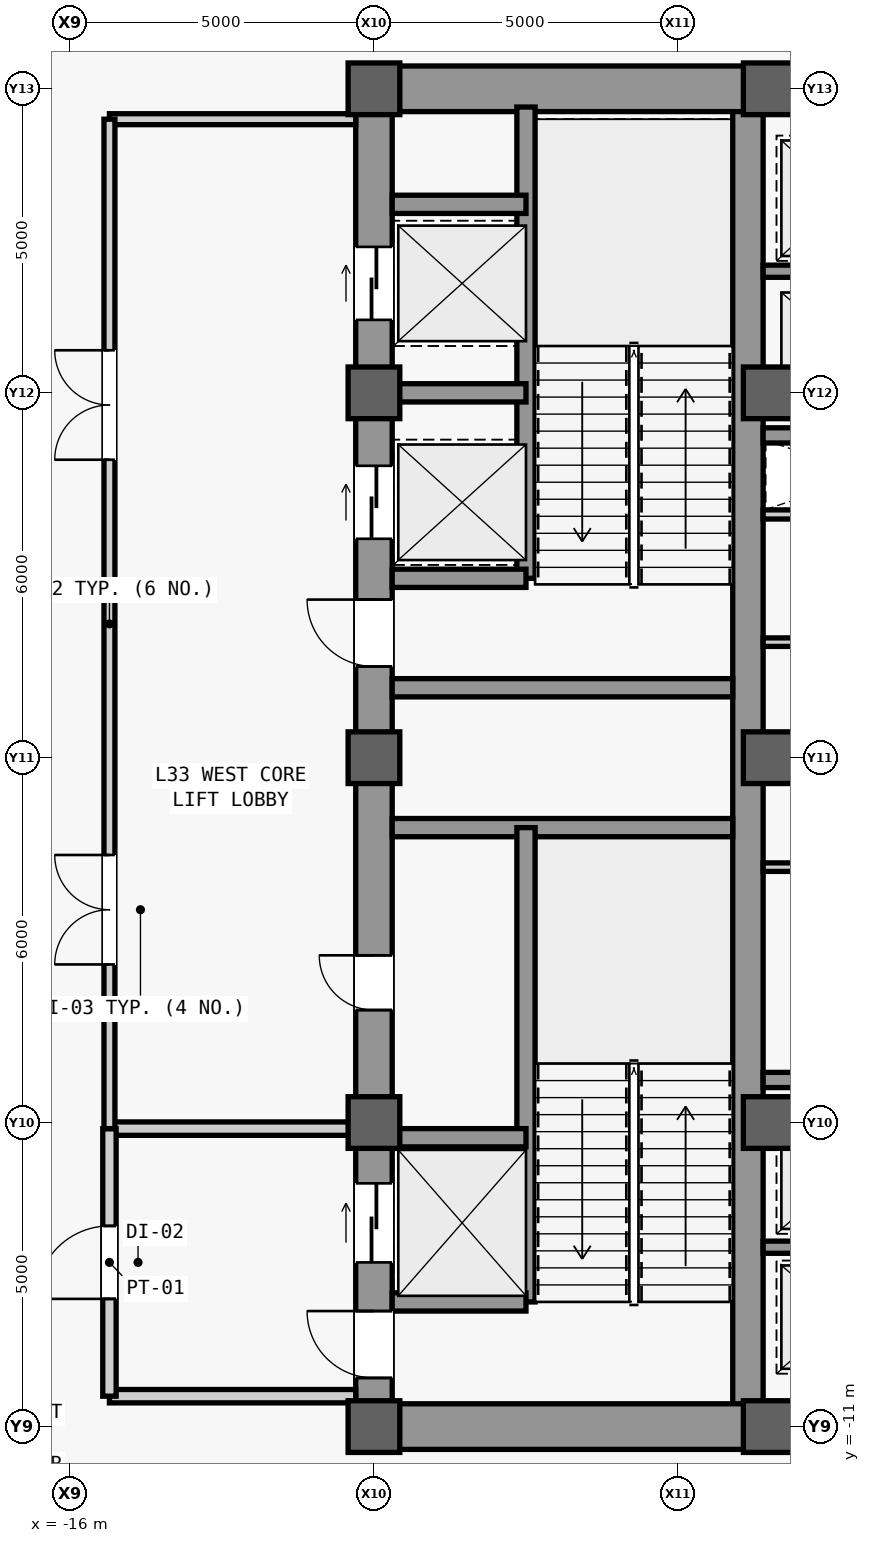
"""IFC4 building model, lengths in metres.
Left out: names, types, materials, properties, quantities, classifications, styles, units other than length and angle.
Written with IfcOpenShell. Run it as: python <this file> out.ifc"""

import sys

from ifc_helpers import new_model, si_unit, direction, frame, frame_2d, origin, origin_2d, place, context, subcontext, project, spatial, rectangle, extrude, source, transform, mapped, element, fill, save


model = new_model("IFC4")
c1 = context("Model", 3, precision=1e-05, world=origin(), true_north=direction((0.0, 1.0)))
c2 = subcontext(c1, "Body", "Model", "MODEL_VIEW")
j1 = project(units=[si_unit("LENGTHUNIT", "METRE"), si_unit("PLANEANGLEUNIT", "RADIAN")], contexts=[c1])
p1 = place(None, origin())
s1 = spatial("IfcSite", under=j1, at=p1, CompositionType="ELEMENT")
p2 = place(p1, origin())
s2 = spatial("IfcBuilding", under=s1, at=p2, CompositionType="ELEMENT")
p3 = place(p2, frame((0.0, 0.0, 144.7)))
s3 = spatial("IfcBuildingStorey", under=s2, at=p3, CompositionType="ELEMENT", Elevation=144.7)
m1 = source(origin(), c2, "Body", "SweptSolid", [
    extrude(rectangle(XDim=22.0, YDim=0.6, at=frame_2d((11.0, 0.0))), origin(), (0.0, 0.0, 1.0), 4.6),
])
p4 = place(p3, frame((-11.0, -11.0, 0.0), z_axis=(0.0, 0.0, 1.0), x_axis=(0.0, 1.0, 0.0)))
e1 = element("IfcWall", 1, at=p4, inside=s3, PredefinedType="SHEAR", context=c2, shape_type="MappedRepresentation", body=[
    mapped(m1, transform((0.0, 0.0, 0.0), scale=1.0)),
])
m2 = source(origin(), c2, "Body", "SweptSolid", [
    extrude(rectangle(XDim=1.1, YDim=2.2, at=frame_2d((0.55, 1.1))), frame((0.0, 0.31, 0.0), z_axis=(0.0, -1.0, 0.0), x_axis=(1.0, 0.0, 0.0)), (0.0, 0.0, 1.0), 0.62),
])
p5 = place(p4, frame((0.8, 0.0, 0.0)))
e2 = element("IfcOpeningElement", 2, at=p5, cuts=e1, PredefinedType="OPENING", context=c2, shape_type="MappedRepresentation", body=[
    mapped(m2, transform((0.0, 0.0, 0.0), scale=1.0)),
])
p6 = place(p4, frame((12.5, 0.0, 0.0)))
e3 = element("IfcOpeningElement", 3, at=p6, cuts=e1, PredefinedType="OPENING", context=c2, shape_type="MappedRepresentation", body=[
    mapped(m2, transform((0.0, 0.0, 0.0), scale=1.0)),
])
m3 = source(origin(), c2, "Body", "SweptSolid", [
    extrude(rectangle(XDim=0.9, YDim=2.15, at=frame_2d((0.45, 1.075))), frame((0.0, 0.31, 0.0), z_axis=(0.0, -1.0, 0.0), x_axis=(1.0, 0.0, 0.0)), (0.0, 0.0, 1.0), 0.62),
])
p7 = place(p4, frame((6.85, 0.0, 0.0)))
e4 = element("IfcOpeningElement", 4, at=p7, cuts=e1, PredefinedType="OPENING", context=c2, shape_type="MappedRepresentation", body=[
    mapped(m3, transform((0.0, 0.0, 0.0), scale=1.0)),
])
m4 = source(origin(), c2, "Body", "SweptSolid", [
    extrude(rectangle(XDim=1.2, YDim=2.3, at=frame_2d((0.6, 1.15))), frame((0.0, 0.31, 0.0), z_axis=(0.0, -1.0, 0.0), x_axis=(1.0, 0.0, 0.0)), (0.0, 0.0, 1.0), 0.62),
])
p8 = place(p4, frame((14.6, 0.0, 0.0)))
e5 = element("IfcOpeningElement", 5, at=p8, cuts=e1, PredefinedType="OPENING", context=c2, shape_type="MappedRepresentation", body=[
    mapped(m4, transform((0.0, 0.0, 0.0), scale=1.0)),
])
p9 = place(p4, frame((18.2, 0.0, 0.0)))
e6 = element("IfcOpeningElement", 6, at=p9, cuts=e1, PredefinedType="OPENING", context=c2, shape_type="MappedRepresentation", body=[
    mapped(m4, transform((0.0, 0.0, 0.0), scale=1.0)),
])
m5 = source(origin(), c2, "Body", "SweptSolid", [
    extrude(rectangle(XDim=1.3, YDim=2.3, at=frame_2d((0.65, 1.15))), frame((0.0, 0.31, 0.0), z_axis=(0.0, -1.0, 0.0), x_axis=(1.0, 0.0, 0.0)), (0.0, 0.0, 1.0), 0.62),
])
p10 = place(p4, frame((2.7, 0.0, 0.0)))
e7 = element("IfcOpeningElement", 7, at=p10, cuts=e1, PredefinedType="OPENING", context=c2, shape_type="MappedRepresentation", body=[
    mapped(m5, transform((0.0, 0.0, 0.0), scale=1.0)),
])
m6 = source(origin(), c2, "Body", "SweptSolid", [
    extrude(rectangle(XDim=21.4, YDim=0.5, at=frame_2d((10.7, 0.0))), origin(), (0.0, 0.0, 1.0), 4.6),
])
p11 = place(p3, frame((-4.85, -10.7, 0.0), z_axis=(0.0, 0.0, 1.0), x_axis=(0.0, 1.0, 0.0)))
e8 = element("IfcWall", 8, at=p11, inside=s3, PredefinedType="SHEAR", context=c2, shape_type="MappedRepresentation", body=[
    mapped(m6, transform((0.0, 0.0, 0.0), scale=1.0)),
])
m7 = source(origin(), c2, "Body", "SweptSolid", [
    extrude(rectangle(XDim=5.85, YDim=0.75, at=frame_2d((2.925, 0.0))), origin(), (0.0, 0.0, 1.0), 4.6),
])
for number, where, z_axis, x_axis in (
    (9, (-10.7, -11.0, 0.0), (0.0, 0.0, 1.0), (1.0, 0.0, 0.0)),
    (10, (-10.7, 11.0, 0.0), (0.0, 0.0, 1.0), (1.0, 0.0, 0.0)),
):
    element("IfcWall", number, at=place(p3, frame(where, z_axis=z_axis, x_axis=x_axis)), inside=s3, PredefinedType="SHEAR", context=c2, shape_type="MappedRepresentation", body=[
        mapped(m7, transform((0.0, 0.0, 0.0), scale=1.0)),
    ])
m8 = source(origin(), c2, "Body", "SweptSolid", [
    extrude(rectangle(XDim=5.6, YDim=0.3, at=frame_2d((2.8, 0.0))), origin(), (0.0, 0.0, 1.0), 4.6),
])
for number, where, z_axis, x_axis in (
    (11, (-10.7, -1.15, 0.0), (0.0, 0.0, 1.0), (1.0, 0.0, 0.0)),
    (12, (-10.7, 1.15, 0.0), (0.0, 0.0, 1.0), (1.0, 0.0, 0.0)),
):
    element("IfcWall", number, at=place(p3, frame(where, z_axis=z_axis, x_axis=x_axis)), inside=s3, PredefinedType="SHEAR", context=c2, shape_type="MappedRepresentation", body=[
        mapped(m8, transform((0.0, 0.0, 0.0), scale=1.0)),
    ])
m9 = source(origin(), c2, "Body", "SweptSolid", [
    extrude(rectangle(XDim=9.2, YDim=0.5, at=frame_2d((4.6, 0.0))), origin(), (0.0, 0.0, 1.0), 4.6),
])
p12 = place(p3, frame((-4.6, -11.0, 0.0), z_axis=(0.0, 0.0, 1.0), x_axis=(1.0, 0.0, 0.0)))
e13 = element("IfcWall", 13, at=p12, inside=s3, PredefinedType="SHEAR", context=c2, shape_type="MappedRepresentation", body=[
    mapped(m9, transform((0.0, 0.0, 0.0), scale=1.0)),
])
m10 = source(origin(), c2, "Body", "SweptSolid", [
    extrude(rectangle(XDim=1.8, YDim=2.25, at=frame_2d((0.9, 1.125))), frame((0.0, 0.26, 0.0), z_axis=(0.0, -1.0, 0.0), x_axis=(1.0, 0.0, 0.0)), (0.0, 0.0, 1.0), 0.52),
])
p13 = place(p12, frame((3.7, 0.0, 0.0)))
e14 = element("IfcOpeningElement", 14, at=p13, cuts=e13, PredefinedType="OPENING", context=c2, shape_type="MappedRepresentation", body=[
    mapped(m10, transform((0.0, 0.0, 0.0), scale=1.0)),
])
p14 = place(p3, frame((-4.6, 11.0, 0.0), z_axis=(0.0, 0.0, 1.0), x_axis=(1.0, 0.0, 0.0)))
e15 = element("IfcWall", 15, at=p14, inside=s3, PredefinedType="SHEAR", context=c2, shape_type="MappedRepresentation", body=[
    mapped(m9, transform((0.0, 0.0, 0.0), scale=1.0)),
])
p15 = place(p14, frame((3.7, 0.0, 0.0)))
e16 = element("IfcOpeningElement", 16, at=p15, cuts=e15, PredefinedType="OPENING", context=c2, shape_type="MappedRepresentation", body=[
    mapped(m10, transform((0.0, 0.0, 0.0), scale=1.0)),
])
m11 = source(origin(), c2, "Body", "SweptSolid", [
    extrude(rectangle(XDim=0.85, YDim=0.85, at=origin_2d()), origin(), (0.0, 0.0, 1.0), 5.2),
])
for number, where, z_axis, x_axis in (
    (17, (-11.0, -11.0, 0.0), (0.0, 0.0, 1.0), (1.0, 0.0, 0.0)),
    (18, (-11.0, -6.0, 0.0), (0.0, 0.0, 1.0), (1.0, 0.0, 0.0)),
    (19, (-11.0, 0.0, 0.0), (0.0, 0.0, 1.0), (1.0, 0.0, 0.0)),
    (20, (-11.0, 6.0, 0.0), (0.0, 0.0, 1.0), (1.0, 0.0, 0.0)),
    (21, (-11.0, 11.0, 0.0), (0.0, 0.0, 1.0), (1.0, 0.0, 0.0)),
    (22, (-4.5, -11.0, 0.0), (0.0, 0.0, 1.0), (1.0, 0.0, 0.0)),
    (23, (-4.5, -6.0, 0.0), (0.0, 0.0, 1.0), (1.0, 0.0, 0.0)),
    (24, (-4.5, 0.0, 0.0), (0.0, 0.0, 1.0), (1.0, 0.0, 0.0)),
    (25, (-4.5, 6.0, 0.0), (0.0, 0.0, 1.0), (1.0, 0.0, 0.0)),
    (26, (-4.5, 11.0, 0.0), (0.0, 0.0, 1.0), (1.0, 0.0, 0.0)),
):
    element("IfcColumn", number, at=place(p3, frame(where, z_axis=z_axis, x_axis=x_axis)), inside=s3, PredefinedType="COLUMN", context=c2, shape_type="MappedRepresentation", body=[
        mapped(m11, transform((0.0, 0.0, 0.0), scale=1.0)),
    ])
m12 = source(origin(), c2, "Body", "SweptSolid", [
    extrude(rectangle(XDim=7.8, YDim=0.3, at=frame_2d((3.9, 0.0))), origin(), (0.0, 0.0, 1.0), 4.6),
])
p16 = place(p3, frame((-8.5, -8.95, 0.0), z_axis=(0.0, 0.0, 1.0), x_axis=(0.0, 1.0, 0.0)))
e27 = element("IfcWall", 27, at=p16, inside=s3, PredefinedType="SHEAR", context=c2, shape_type="MappedRepresentation", body=[
    mapped(m12, transform((0.0, 0.0, 0.0), scale=1.0)),
])
m13 = source(origin(), c2, "Body", "SweptSolid", [
    extrude(rectangle(XDim=2.2, YDim=0.3, at=frame_2d((1.1, 0.0))), origin(), (0.0, 0.0, 1.0), 4.6),
])
for number, where, z_axis, x_axis in (
    (28, (-10.7, -8.95, 0.0), (0.0, 0.0, 1.0), (1.0, 0.0, 0.0)),
    (29, (-10.7, -6.25, 0.0), (0.0, 0.0, 1.0), (1.0, 0.0, 0.0)),
):
    element("IfcWall", number, at=place(p3, frame(where, z_axis=z_axis, x_axis=x_axis)), inside=s3, PredefinedType="SHEAR", context=c2, shape_type="MappedRepresentation", body=[
        mapped(m13, transform((0.0, 0.0, 0.0), scale=1.0)),
    ])
m14 = source(origin(), c2, "Body", "SweptSolid", [
    extrude(rectangle(XDim=7.75, YDim=0.3, at=frame_2d((3.875, 0.0))), origin(), (0.0, 0.0, 1.0), 4.6),
])
p17 = place(p3, frame((-8.5, 2.95, 0.0), z_axis=(0.0, 0.0, 1.0), x_axis=(0.0, 1.0, 0.0)))
e30 = element("IfcWall", 30, at=p17, inside=s3, PredefinedType="SHEAR", context=c2, shape_type="MappedRepresentation", body=[
    mapped(m14, transform((0.0, 0.0, 0.0), scale=1.0)),
])
for number, where, z_axis, x_axis in (
    (31, (-10.7, 2.95, 0.0), (0.0, 0.0, 1.0), (1.0, 0.0, 0.0)),
    (32, (-10.7, 6.0, 0.0), (0.0, 0.0, 1.0), (1.0, 0.0, 0.0)),
    (33, (-10.7, 9.1, 0.0), (0.0, 0.0, 1.0), (1.0, 0.0, 0.0)),
):
    element("IfcWall", number, at=place(p3, frame(where, z_axis=z_axis, x_axis=x_axis)), inside=s3, PredefinedType="SHEAR", context=c2, shape_type="MappedRepresentation", body=[
        mapped(m13, transform((0.0, 0.0, 0.0), scale=1.0)),
    ])
m15 = source(origin(), c2, "Body", "SweptSolid", [
    extrude(rectangle(XDim=4.05, YDim=0.22, at=frame_2d((2.025, 0.0))), origin(), (0.0, 0.0, 1.0), 4.6),
])
p18 = place(p3, frame((-15.35, -10.5, 0.0), z_axis=(0.0, 0.0, 1.0), x_axis=(1.0, 0.0, 0.0)))
e34 = element("IfcWall", 34, at=p18, inside=s3, PredefinedType="PARTITIONING", context=c2, shape_type="MappedRepresentation", body=[
    mapped(m15, transform((0.0, 0.0, 0.0), scale=1.0)),
])
m16 = source(origin(), c2, "Body", "SweptSolid", [
    extrude(rectangle(XDim=4.05, YDim=0.22, at=frame_2d((2.025, 0.0))), origin(), (0.0, 0.0, 1.0), 2.8),
])
p19 = place(p3, frame((-15.35, -6.1, 0.0), z_axis=(0.0, 0.0, 1.0), x_axis=(1.0, 0.0, 0.0)))
e35 = element("IfcWall", 35, at=p19, inside=s3, PredefinedType="PARTITIONING", context=c2, shape_type="MappedRepresentation", body=[
    mapped(m16, transform((0.0, 0.0, 0.0), scale=1.0)),
])
m17 = source(origin(), c2, "Body", "SweptSolid", [
    extrude(rectangle(XDim=4.4, YDim=0.22, at=frame_2d((2.2, 0.0))), origin(), (0.0, 0.0, 1.0), 4.6),
])
p20 = place(p3, frame((-15.35, -10.5, 0.0), z_axis=(0.0, 0.0, 1.0), x_axis=(0.0, 1.0, 0.0)))
e36 = element("IfcWall", 36, at=p20, inside=s3, PredefinedType="PARTITIONING", context=c2, shape_type="MappedRepresentation", body=[
    mapped(m17, transform((0.0, 0.0, 0.0), scale=1.0)),
])
m18 = source(origin(), c2, "Body", "SweptSolid", [
    extrude(rectangle(XDim=1.2, YDim=2.2, at=frame_2d((0.6, 1.1))), frame((0.0, 0.12, 0.0), z_axis=(0.0, -1.0, 0.0), x_axis=(1.0, 0.0, 0.0)), (0.0, 0.0, 1.0), 0.24),
])
p21 = place(p20, frame((1.6, 0.0, 0.0)))
e37 = element("IfcOpeningElement", 37, at=p21, cuts=e36, PredefinedType="OPENING", context=c2, shape_type="MappedRepresentation", body=[
    mapped(m18, transform((0.0, 0.0, 0.0), scale=1.0)),
])
m19 = source(origin(), c2, "Body", "SweptSolid", [
    extrude(rectangle(XDim=4.05, YDim=0.18, at=frame_2d((2.025, 0.0))), origin(), (0.0, 0.0, 1.0), 4.6),
])
p22 = place(p3, frame((-15.35, 10.5, 0.0), z_axis=(0.0, 0.0, 1.0), x_axis=(1.0, 0.0, 0.0)))
e38 = element("IfcWall", 38, at=p22, inside=s3, PredefinedType="PARTITIONING", context=c2, shape_type="MappedRepresentation", body=[
    mapped(m19, transform((0.0, 0.0, 0.0), scale=1.0)),
])
m20 = source(origin(), c2, "Body", "SweptSolid", [
    extrude(rectangle(XDim=16.6, YDim=0.18, at=frame_2d((8.3, 0.0))), origin(), (0.0, 0.0, 1.0), 4.6),
])
p23 = place(p3, frame((-15.35, -6.1, 0.0), z_axis=(0.0, 0.0, 1.0), x_axis=(0.0, 1.0, 0.0)))
e39 = element("IfcWall", 39, at=p23, inside=s3, PredefinedType="PARTITIONING", context=c2, shape_type="MappedRepresentation", body=[
    mapped(m20, transform((0.0, 0.0, 0.0), scale=1.0)),
])
m21 = source(origin(), c2, "Body", "SweptSolid", [
    extrude(rectangle(XDim=1.8, YDim=2.25, at=frame_2d((0.9, 1.125))), frame((0.0, 0.1, 0.0), z_axis=(0.0, -1.0, 0.0), x_axis=(1.0, 0.0, 0.0)), (0.0, 0.0, 1.0), 0.2),
])
p24 = place(p23, frame((2.7, 0.0, 0.0)))
e40 = element("IfcOpeningElement", 40, at=p24, cuts=e39, PredefinedType="OPENING", context=c2, shape_type="MappedRepresentation", body=[
    mapped(m21, transform((0.0, 0.0, 0.0), scale=1.0)),
])
p25 = place(p23, frame((11.0, 0.0, 0.0)))
e41 = element("IfcOpeningElement", 41, at=p25, cuts=e39, PredefinedType="OPENING", context=c2, shape_type="MappedRepresentation", body=[
    mapped(m21, transform((0.0, 0.0, 0.0), scale=1.0)),
])
m22 = source(origin(), c2, "Body", "SweptSolid", [
    extrude(rectangle(XDim=3.45, YDim=0.15, at=frame_2d((1.725, 0.0))), origin(), (0.0, 0.0, 1.0), 4.6),
])
p26 = place(p3, frame((-4.6, 4.0, 0.0), z_axis=(0.0, 0.0, 1.0), x_axis=(1.0, 0.0, 0.0)))
e42 = element("IfcWall", 42, at=p26, inside=s3, PredefinedType="PARTITIONING", context=c2, shape_type="MappedRepresentation", body=[
    mapped(m22, transform((0.0, 0.0, 0.0), scale=1.0)),
])
m23 = source(origin(), c2, "Body", "SweptSolid", [
    extrude(rectangle(XDim=2.45, YDim=0.2, at=frame_2d((1.225, 0.0))), origin(), (0.0, 0.0, 1.0), 4.6),
])
p27 = place(p3, frame((-4.6, -8.05, 0.0), z_axis=(0.0, 0.0, 1.0), x_axis=(1.0, 0.0, 0.0)))
e43 = element("IfcWall", 43, at=p27, inside=s3, PredefinedType="SHEAR", context=c2, shape_type="MappedRepresentation", body=[
    mapped(m23, transform((0.0, 0.0, 0.0), scale=1.0)),
])
m24 = source(origin(), c2, "Body", "SweptSolid", [
    extrude(rectangle(XDim=9.2, YDim=0.25, at=frame_2d((4.6, 0.0))), origin(), (0.0, 0.0, 1.0), 4.6),
])
p28 = place(p3, frame((-4.6, -5.3, 0.0), z_axis=(0.0, 0.0, 1.0), x_axis=(1.0, 0.0, 0.0)))
e44 = element("IfcWall", 44, at=p28, inside=s3, PredefinedType="SHEAR", context=c2, shape_type="MappedRepresentation", body=[
    mapped(m24, transform((0.0, 0.0, 0.0), scale=1.0)),
])
m25 = source(origin(), c2, "Body", "SweptSolid", [
    extrude(rectangle(XDim=1.05, YDim=2.2, at=frame_2d((0.525, 1.1))), frame((0.0, 0.135, 0.0), z_axis=(0.0, -1.0, 0.0), x_axis=(1.0, 0.0, 0.0)), (0.0, 0.0, 1.0), 0.27),
])
p29 = place(p28, frame((4.075, 0.0, 0.0)))
e45 = element("IfcOpeningElement", 45, at=p29, cuts=e44, PredefinedType="OPENING", context=c2, shape_type="MappedRepresentation", body=[
    mapped(m25, transform((0.0, 0.0, 0.0), scale=1.0)),
])
p30 = place(p3, frame((-4.6, 8.0, 0.0), z_axis=(0.0, 0.0, 1.0), x_axis=(1.0, 0.0, 0.0)))
e46 = element("IfcWall", 46, at=p30, inside=s3, PredefinedType="SHEAR", context=c2, shape_type="MappedRepresentation", body=[
    mapped(m23, transform((0.0, 0.0, 0.0), scale=1.0)),
])
p31 = place(p3, frame((-4.6, 5.3, 0.0), z_axis=(0.0, 0.0, 1.0), x_axis=(1.0, 0.0, 0.0)))
e47 = element("IfcWall", 47, at=p31, inside=s3, PredefinedType="SHEAR", context=c2, shape_type="MappedRepresentation", body=[
    mapped(m24, transform((0.0, 0.0, 0.0), scale=1.0)),
])
p32 = place(p31, frame((4.075, 0.0, 0.0)))
e48 = element("IfcOpeningElement", 48, at=p32, cuts=e47, PredefinedType="OPENING", context=c2, shape_type="MappedRepresentation", body=[
    mapped(m25, transform((0.0, 0.0, 0.0), scale=1.0)),
])
m26 = source(origin(), c2, "Body", "SweptSolid", [
    extrude(rectangle(XDim=3.45, YDim=0.14, at=frame_2d((1.725, 0.0))), origin(), (0.0, 0.0, 1.0), 4.6),
])
for number, where, z_axis, x_axis in (
    (49, (-4.6, -1.8, 0.0), (0.0, 0.0, 1.0), (1.0, 0.0, 0.0)),
    (50, (-4.6, 1.9, 0.0), (0.0, 0.0, 1.0), (1.0, 0.0, 0.0)),
):
    element("IfcWall", number, at=place(p3, frame(where, z_axis=z_axis, x_axis=x_axis)), inside=s3, PredefinedType="PARTITIONING", context=c2, shape_type="MappedRepresentation", body=[
        mapped(m26, transform((0.0, 0.0, 0.0), scale=1.0)),
    ])
m27 = source(origin(), c2, "Body", "SweptSolid", [
    extrude(rectangle(XDim=1.1, YDim=2.2, at=frame_2d((0.55, 1.1))), frame((0.0, 0.025, 0.0), z_axis=(0.0, -1.0, 0.0), x_axis=(1.0, 0.0, 0.0)), (0.0, 0.0, 1.0), 0.05),
])
p33 = place(p5, origin())
e51 = element("IfcDoor", 51, at=p33, inside=s3, OperationType="SINGLE_SWING_RIGHT", PredefinedType="DOOR", context=c2, shape_type="MappedRepresentation", body=[
    mapped(m27, transform((0.0, 0.0, 0.0), scale=1.0)),
])
fill(e2, e51)
p34 = place(p6, origin())
e52 = element("IfcDoor", 52, at=p34, inside=s3, OperationType="SINGLE_SWING_RIGHT", PredefinedType="DOOR", context=c2, shape_type="MappedRepresentation", body=[
    mapped(m27, transform((0.0, 0.0, 0.0), scale=1.0)),
])
fill(e3, e52)
m28 = source(origin(), c2, "Body", "SweptSolid", [
    extrude(rectangle(XDim=0.9, YDim=2.15, at=frame_2d((0.45, 1.075))), frame((0.0, 0.025, 0.0), z_axis=(0.0, -1.0, 0.0), x_axis=(1.0, 0.0, 0.0)), (0.0, 0.0, 1.0), 0.05),
])
p35 = place(p7, origin())
e53 = element("IfcDoor", 53, at=p35, inside=s3, OperationType="SINGLE_SWING_RIGHT", PredefinedType="DOOR", context=c2, shape_type="MappedRepresentation", body=[
    mapped(m28, transform((0.0, 0.0, 0.0), scale=1.0)),
])
fill(e4, e53)
m29 = source(origin(), c2, "Body", "SweptSolid", [
    extrude(rectangle(XDim=1.2, YDim=2.2, at=frame_2d((0.6, 1.1))), frame((0.0, 0.025, 0.0), z_axis=(0.0, -1.0, 0.0), x_axis=(1.0, 0.0, 0.0)), (0.0, 0.0, 1.0), 0.05),
])
p36 = place(p21, origin())
e54 = element("IfcDoor", 54, at=p36, inside=s3, OperationType="SINGLE_SWING_LEFT", PredefinedType="DOOR", context=c2, shape_type="MappedRepresentation", body=[
    mapped(m29, transform((0.0, 0.0, 0.0), scale=1.0)),
])
fill(e37, e54)
m30 = source(origin(), c2, "Body", "SweptSolid", [
    extrude(rectangle(XDim=1.8, YDim=2.25, at=frame_2d((0.9, 1.125))), frame((0.0, 0.025, 0.0), z_axis=(0.0, -1.0, 0.0), x_axis=(1.0, 0.0, 0.0)), (0.0, 0.0, 1.0), 0.05),
])
p37 = place(p24, origin())
e55 = element("IfcDoor", 55, at=p37, inside=s3, OperationType="SINGLE_SWING_LEFT", PredefinedType="DOOR", context=c2, shape_type="MappedRepresentation", body=[
    mapped(m30, transform((0.0, 0.0, 0.0), scale=1.0)),
])
fill(e40, e55)
p38 = place(p25, origin())
e56 = element("IfcDoor", 56, at=p38, inside=s3, OperationType="SINGLE_SWING_RIGHT", PredefinedType="DOOR", context=c2, shape_type="MappedRepresentation", body=[
    mapped(m30, transform((0.0, 0.0, 0.0), scale=1.0)),
])
fill(e41, e56)
m31 = source(origin(), c2, "Body", "SweptSolid", [
    extrude(rectangle(XDim=1.2, YDim=2.3, at=frame_2d((0.6, 1.15))), frame((0.0, 0.025, 0.0), z_axis=(0.0, -1.0, 0.0), x_axis=(1.0, 0.0, 0.0)), (0.0, 0.0, 1.0), 0.05),
])
p39 = place(p8, origin())
e57 = element("IfcDoor", 57, at=p39, inside=s3, OperationType="SLIDING_TO_LEFT", PredefinedType="DOOR", context=c2, shape_type="MappedRepresentation", body=[
    mapped(m31, transform((0.0, 0.0, 0.0), scale=1.0)),
])
fill(e5, e57)
p40 = place(p9, origin())
e58 = element("IfcDoor", 58, at=p40, inside=s3, OperationType="SLIDING_TO_LEFT", PredefinedType="DOOR", context=c2, shape_type="MappedRepresentation", body=[
    mapped(m31, transform((0.0, 0.0, 0.0), scale=1.0)),
])
fill(e6, e58)
m32 = source(origin(), c2, "Body", "SweptSolid", [
    extrude(rectangle(XDim=1.3, YDim=2.3, at=frame_2d((0.65, 1.15))), frame((0.0, 0.025, 0.0), z_axis=(0.0, -1.0, 0.0), x_axis=(1.0, 0.0, 0.0)), (0.0, 0.0, 1.0), 0.05),
])
p41 = place(p10, origin())
e59 = element("IfcDoor", 59, at=p41, inside=s3, OperationType="SLIDING_TO_LEFT", PredefinedType="DOOR", context=c2, shape_type="MappedRepresentation", body=[
    mapped(m32, transform((0.0, 0.0, 0.0), scale=1.0)),
])
fill(e7, e59)
save(model, sys.argv[1])
